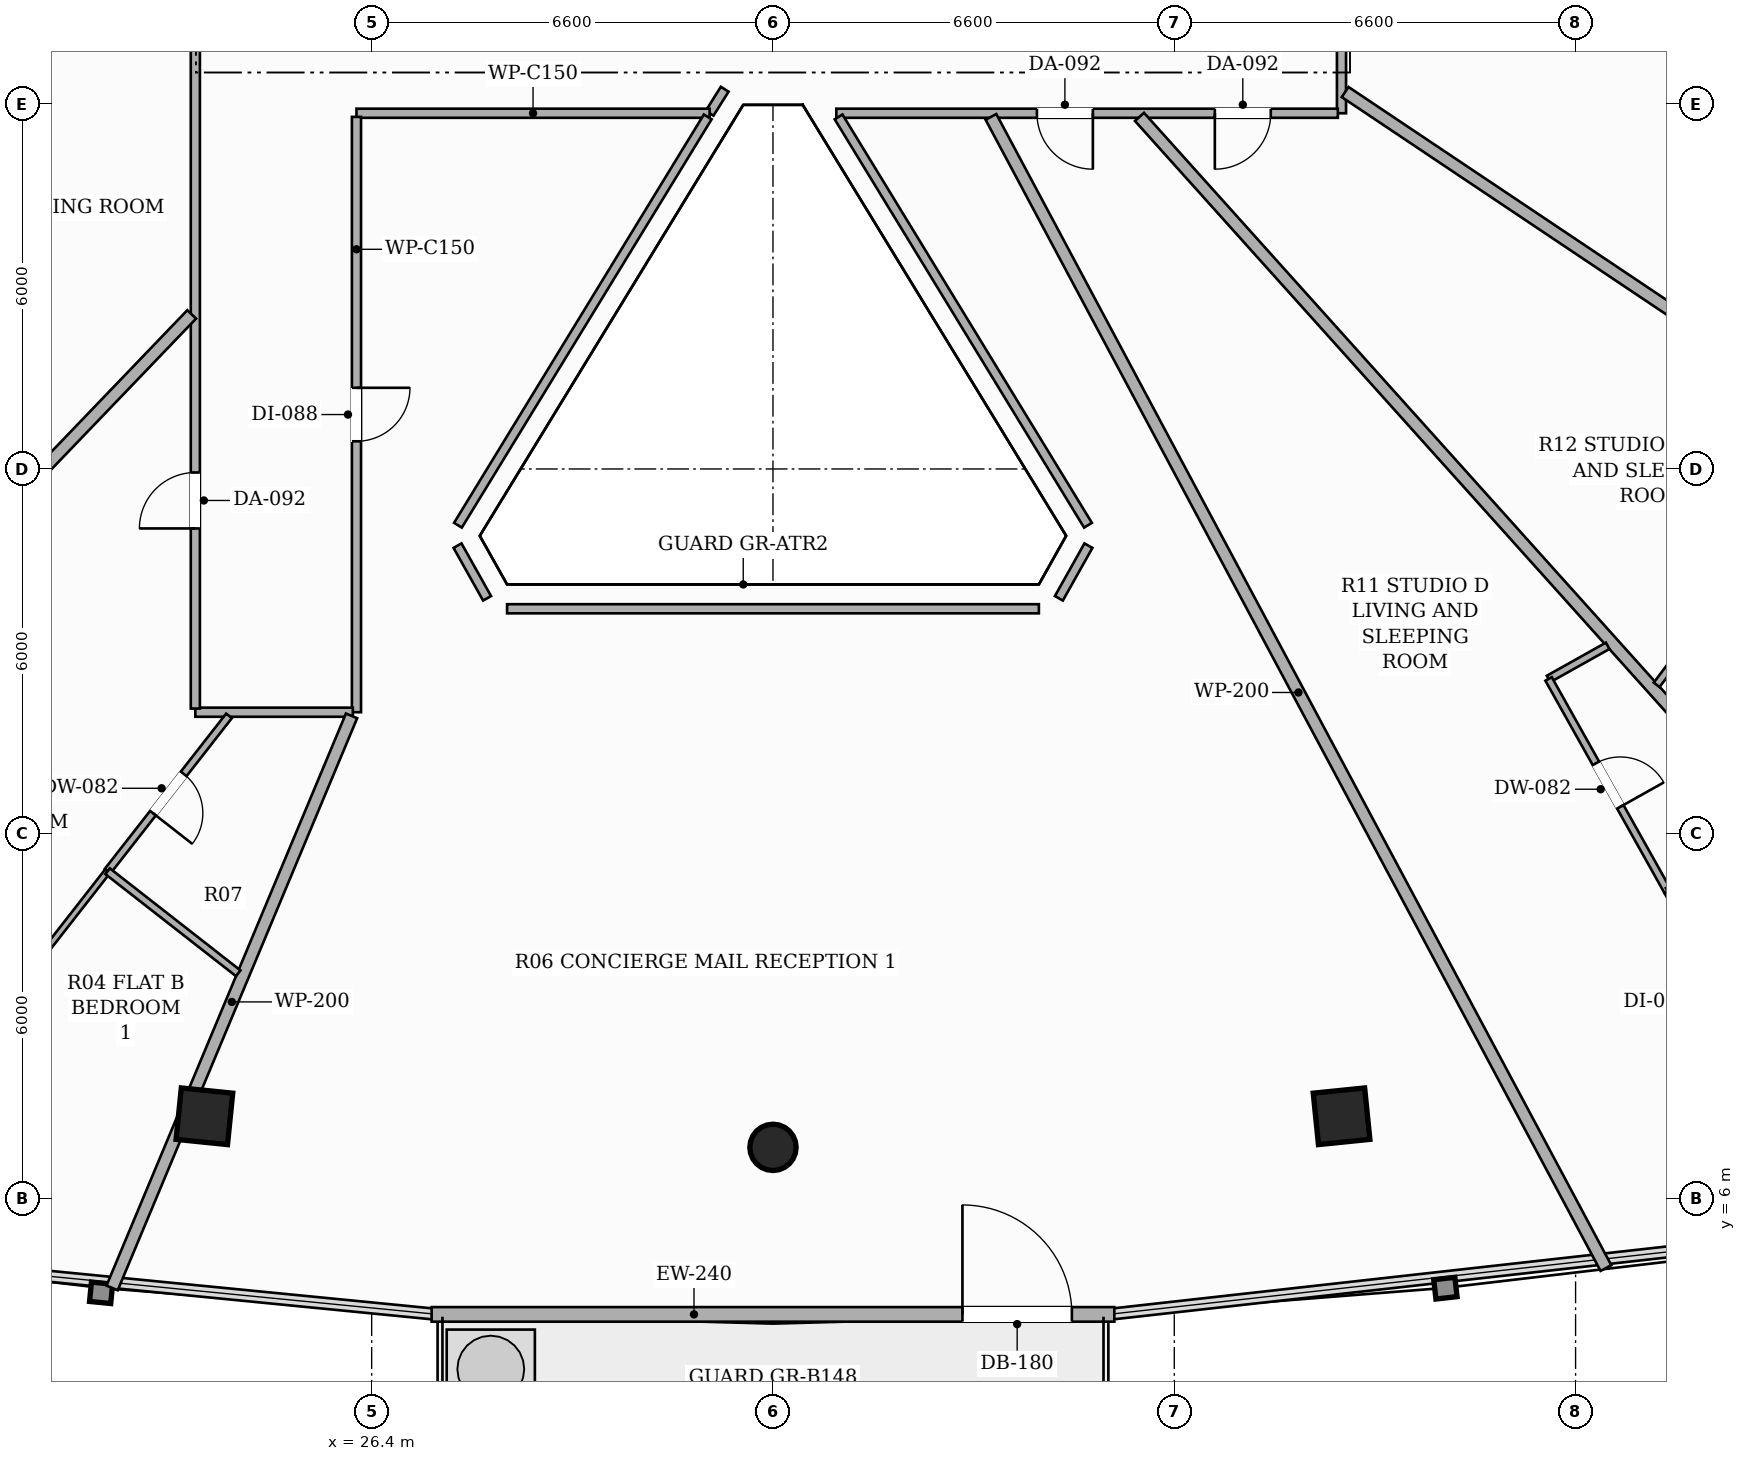
"""IFC4 building model, lengths in metres.
Left out: names, types, materials, properties, quantities, classifications, styles, units other than length and angle.
Written with IfcOpenShell. Run it as: python <this file> out.ifc"""

import sys

from ifc_helpers import new_model, si_unit, direction, frame, frame_2d, origin, origin_2d, place, context, subcontext, project, spatial, rectangle, hollow_rectangle, hollow_circle, extrude, element, fill, save


model = new_model("IFC4")
c1 = context("Model", 3, precision=1e-05, world=origin(), true_north=direction((0.0, 1.0)))
c2 = subcontext(c1, "Body", "Model", "MODEL_VIEW")
j1 = project(units=[si_unit("LENGTHUNIT", "METRE"), si_unit("PLANEANGLEUNIT", "RADIAN")], contexts=[c1])
p1 = place(None, origin())
s1 = spatial("IfcSite", under=j1, at=p1, CompositionType="ELEMENT")
p2 = place(p1, origin())
s2 = spatial("IfcBuilding", under=s1, at=p2, CompositionType="ELEMENT")
p3 = place(p2, frame((0.0, 0.0, 183.65)))
s3 = spatial("IfcBuildingStorey", under=s2, at=p3, CompositionType="ELEMENT", Elevation=183.65)
p4 = place(p3, frame((23.649, 7.355, 0.0), z_axis=(0.0, 0.0, 1.0), x_axis=(-0.994880708829, 0.101056297183, 0.0)))
e1 = element("IfcColumn", 1, at=p4, inside=s3, PredefinedType="COLUMN", context=c2, shape_type="SweptSolid", body=[
    extrude(hollow_rectangle(XDim=0.85, YDim=0.85, WallThickness=0.028, at=origin_2d()), origin(), (0.0, 0.0, 1.0), 3.3),
])
p5 = place(p3, frame((33.0, 6.844, 0.0), z_axis=(0.0, 0.0, 1.0), x_axis=(1.0, 0.0, 0.0)))
e2 = element("IfcColumn", 2, at=p5, inside=s3, PredefinedType="COLUMN", context=c2, shape_type="SweptSolid", body=[
    extrude(hollow_circle(Radius=0.381, WallThickness=0.022, at=origin_2d()), origin(), (0.0, 0.0, 1.0), 3.3),
])
p6 = place(p3, frame((42.351, 7.355, 0.0), z_axis=(0.0, 0.0, 1.0), x_axis=(0.994880708829, 0.101056297183, 0.0)))
e3 = element("IfcColumn", 3, at=p6, inside=s3, PredefinedType="COLUMN", context=c2, shape_type="SweptSolid", body=[
    extrude(hollow_rectangle(XDim=0.85, YDim=0.85, WallThickness=0.028, at=origin_2d()), origin(), (0.0, 0.0, 1.0), 3.3),
])
p7 = place(p3, frame((27.386, 4.097, 0.0), z_axis=(0.0, 0.0, 1.0), x_axis=(1.0, 0.0, 0.0)))
e4 = element("IfcWall", 4, at=p7, inside=s3, PredefinedType="SOLIDWALL", context=c2, shape_type="SweptSolid", body=[
    extrude(rectangle(XDim=11.228, YDim=0.24, at=frame_2d((5.614, 0.0))), origin(), (0.0, 0.0, 1.0), 2.584),
])
p8 = place(p7, frame((8.73, 0.0, 0.0)))
e5 = element("IfcOpeningElement", 5, at=p8, cuts=e4, PredefinedType="OPENING", context=c2, shape_type="SweptSolid", body=[
    extrude(rectangle(XDim=1.8, YDim=2.2, at=frame_2d((0.9, 1.1))), frame((0.0, 0.13, 0.0), z_axis=(0.0, -1.0, 0.0), x_axis=(1.0, 0.0, 0.0)), (0.0, 0.0, 1.0), 0.26),
])
p9 = place(p3, frame((50.652, 24.373, 0.0), z_axis=(0.0, 0.0, 1.0), x_axis=(-0.514290689074, 0.857615932182, 0.0)))
e6 = element("IfcWall", 6, at=p9, inside=s3, PredefinedType="SOLIDWALL", context=c2, shape_type="SweptSolid", body=[
    extrude(rectangle(XDim=10.856, YDim=0.24, at=frame_2d((5.428, 0.0))), origin(), (0.0, 0.0, 1.0), 2.584),
])
p10 = place(p9, frame((8.358, 0.0, 0.0)))
e7 = element("IfcOpeningElement", 7, at=p10, cuts=e6, PredefinedType="OPENING", context=c2, shape_type="SweptSolid", body=[
    extrude(rectangle(XDim=1.8, YDim=2.2, at=frame_2d((0.9, 1.1))), frame((0.0, 0.13, 0.0), z_axis=(0.0, -1.0, 0.0), x_axis=(1.0, 0.0, 0.0)), (0.0, 0.0, 1.0), 0.26),
])
p11 = place(p3, frame((32.206, 24.245, 0.0), z_axis=(0.0, 0.0, 1.0), x_axis=(-0.531785592992, -0.84687902506, 0.0)))
e8 = element("IfcWall", 8, at=p11, inside=s3, PredefinedType="PARTITIONING", context=c2, shape_type="SweptSolid", body=[
    extrude(rectangle(XDim=0.467, YDim=0.15, at=frame_2d((0.233, 0.0))), origin(), (0.0, 0.0, 1.0), 3.02),
])
p12 = place(p3, frame((31.958, 23.85, 0.0), z_axis=(0.0, 0.0, 1.0), x_axis=(-1.0, 0.0, 0.0)))
e9 = element("IfcWall", 9, at=p12, inside=s3, PredefinedType="PARTITIONING", context=c2, shape_type="SweptSolid", body=[
    extrude(rectangle(XDim=5.808, YDim=0.15, at=frame_2d((2.904, 0.0))), origin(), (0.0, 0.0, 1.0), 2.681),
])
p13 = place(p3, frame((26.15, 23.79, 0.0), z_axis=(0.0, 0.0, 1.0), x_axis=(0.0, -1.0, 0.0)))
e10 = element("IfcWall", 10, at=p13, inside=s3, PredefinedType="PARTITIONING", context=c2, shape_type="SweptSolid", body=[
    extrude(rectangle(XDim=9.79, YDim=0.15, at=frame_2d((4.895, 0.0))), origin(), (0.0, 0.0, 1.0), 2.681),
])
p14 = place(p13, frame((4.455, 0.0, 0.0)))
e11 = element("IfcOpeningElement", 11, at=p14, cuts=e10, PredefinedType="OPENING", context=c2, shape_type="SweptSolid", body=[
    extrude(rectangle(XDim=0.88, YDim=2.1, at=frame_2d((0.44, 1.05))), frame((0.0, 0.085, 0.0), z_axis=(0.0, -1.0, 0.0), x_axis=(1.0, 0.0, 0.0)), (0.0, 0.0, 1.0), 0.17),
])
p15 = place(p3, frame((26.09, 14.0, 0.0), z_axis=(0.0, 0.0, 1.0), x_axis=(-1.0, 0.0, 0.0)))
e12 = element("IfcWall", 12, at=p15, inside=s3, PredefinedType="PARTITIONING", context=c2, shape_type="SweptSolid", body=[
    extrude(rectangle(XDim=2.59, YDim=0.15, at=frame_2d((1.295, 0.0))), origin(), (0.0, 0.0, 1.0), 2.681),
])
p16 = place(p3, frame((23.5, 14.06, 0.0), z_axis=(0.0, 0.0, 1.0), x_axis=(0.0, 1.0, 0.0)))
e13 = element("IfcWall", 13, at=p16, inside=s3, PredefinedType="PARTITIONING", context=c2, shape_type="SweptSolid", body=[
    extrude(rectangle(XDim=23.181, YDim=0.15, at=frame_2d((11.59, 0.0))), origin(), (0.0, 0.0, 1.0), 2.373),
])
p17 = place(p16, frame((14.184, 0.0, 0.0)))
e14 = element("IfcOpeningElement", 14, at=p17, cuts=e13, PredefinedType="OPENING", context=c2, shape_type="SweptSolid", body=[
    extrude(rectangle(XDim=0.92, YDim=2.15, at=frame_2d((0.46, 1.075))), frame((0.0, 0.085, 0.0), z_axis=(0.0, -1.0, 0.0), x_axis=(1.0, 0.0, 0.0)), (0.0, 0.0, 1.0), 0.17),
])
p18 = place(p16, frame((2.962, 0.0, 0.0)))
e15 = element("IfcOpeningElement", 15, at=p18, cuts=e13, PredefinedType="OPENING", context=c2, shape_type="SweptSolid", body=[
    extrude(rectangle(XDim=0.92, YDim=2.15, at=frame_2d((0.46, 1.075))), frame((0.0, 0.085, 0.0), z_axis=(0.0, -1.0, 0.0), x_axis=(1.0, 0.0, 0.0)), (0.0, 0.0, 1.0), 0.17),
])
p19 = place(p3, frame((42.35, 28.34, 0.0), z_axis=(0.0, 0.0, 1.0), x_axis=(0.0, -1.0, 0.0)))
e16 = element("IfcWall", 16, at=p19, inside=s3, PredefinedType="PARTITIONING", context=c2, shape_type="SweptSolid", body=[
    extrude(rectangle(XDim=4.49, YDim=0.15, at=frame_2d((2.245, 0.0))), origin(), (0.0, 0.0, 1.0), 2.681),
])
p20 = place(p19, frame((1.783, 0.0, 0.0)))
e17 = element("IfcOpeningElement", 17, at=p20, cuts=e16, PredefinedType="OPENING", context=c2, shape_type="SweptSolid", body=[
    extrude(rectangle(XDim=0.88, YDim=2.1, at=frame_2d((0.44, 1.05))), frame((0.0, 0.085, 0.0), z_axis=(0.0, -1.0, 0.0), x_axis=(1.0, 0.0, 0.0)), (0.0, 0.0, 1.0), 0.17),
])
p21 = place(p3, frame((42.29, 23.85, 0.0), z_axis=(0.0, 0.0, 1.0), x_axis=(-1.0, 0.0, 0.0)))
e18 = element("IfcWall", 18, at=p21, inside=s3, PredefinedType="PARTITIONING", context=c2, shape_type="SweptSolid", body=[
    extrude(rectangle(XDim=8.248, YDim=0.15, at=frame_2d((4.124, 0.0))), origin(), (0.0, 0.0, 1.0), 2.452),
])
p22 = place(p21, frame((1.103, 0.0, 0.0)))
e19 = element("IfcOpeningElement", 19, at=p22, cuts=e18, PredefinedType="OPENING", context=c2, shape_type="SweptSolid", body=[
    extrude(rectangle(XDim=0.92, YDim=2.15, at=frame_2d((0.46, 1.075))), frame((0.0, 0.085, 0.0), z_axis=(0.0, -1.0, 0.0), x_axis=(1.0, 0.0, 0.0)), (0.0, 0.0, 1.0), 0.17),
])
p23 = place(p21, frame((4.029, 0.0, 0.0)))
e20 = element("IfcOpeningElement", 20, at=p23, cuts=e18, PredefinedType="OPENING", context=c2, shape_type="SweptSolid", body=[
    extrude(rectangle(XDim=0.92, YDim=2.15, at=frame_2d((0.46, 1.075))), frame((0.0, 0.085, 0.0), z_axis=(0.0, -1.0, 0.0), x_axis=(1.0, 0.0, 0.0)), (0.0, 0.0, 1.0), 0.17),
])
p24 = place(p3, frame((34.079, 23.79, 0.0), z_axis=(0.0, 0.0, 1.0), x_axis=(0.521278062647, -0.853386888465, 0.0)))
e21 = element("IfcWall", 21, at=p24, inside=s3, PredefinedType="PARTITIONING", context=c2, shape_type="SweptSolid", body=[
    extrude(rectangle(XDim=7.869, YDim=0.15, at=frame_2d((3.934, 0.0))), origin(), (0.0, 0.0, 1.0), 2.681),
])
p25 = place(p3, frame((38.188, 16.739, 0.0), z_axis=(0.0, 0.0, 1.0), x_axis=(-0.489479004575, -0.872015082485, 0.0)))
e22 = element("IfcWall", 22, at=p25, inside=s3, PredefinedType="PARTITIONING", context=c2, shape_type="SweptSolid", body=[
    extrude(rectangle(XDim=0.993, YDim=0.15, at=frame_2d((0.497, 0.0))), origin(), (0.0, 0.0, 1.0), 3.02),
])
p26 = place(p3, frame((37.373, 15.701, 0.0), z_axis=(0.0, 0.0, 1.0), x_axis=(-1.0, 0.0, 0.0)))
e23 = element("IfcWall", 23, at=p26, inside=s3, PredefinedType="PARTITIONING", context=c2, shape_type="SweptSolid", body=[
    extrude(rectangle(XDim=8.746, YDim=0.15, at=frame_2d((4.373, 0.0))), origin(), (0.0, 0.0, 1.0), 2.681),
])
p27 = place(p3, frame((28.298, 15.873, 0.0), z_axis=(0.0, 0.0, 1.0), x_axis=(-0.489479004575, 0.872015082485, 0.0)))
e24 = element("IfcWall", 24, at=p27, inside=s3, PredefinedType="PARTITIONING", context=c2, shape_type="SweptSolid", body=[
    extrude(rectangle(XDim=0.993, YDim=0.15, at=frame_2d((0.497, 0.0))), origin(), (0.0, 0.0, 1.0), 3.02),
])
p28 = place(p3, frame((27.819, 17.075, 0.0), z_axis=(0.0, 0.0, 1.0), x_axis=(0.52184261318, 0.853041785066, 0.0)))
e25 = element("IfcWall", 25, at=p28, inside=s3, PredefinedType="PARTITIONING", context=c2, shape_type="SweptSolid", body=[
    extrude(rectangle(XDim=7.872, YDim=0.15, at=frame_2d((3.936, 0.0))), origin(), (0.0, 0.0, 1.0), 2.681),
])
p29 = place(p3, frame((22.131, 4.532, 0.0), z_axis=(0.0, 0.0, 1.0), x_axis=(0.38611914038, 0.922448919687, 0.0)))
e26 = element("IfcWall", 26, at=p29, inside=s3, PredefinedType="PARTITIONING", context=c2, shape_type="SweptSolid", body=[
    extrude(rectangle(XDim=10.199, YDim=0.2, at=frame_2d((5.1, 0.0))), origin(), (0.0, 0.0, 1.0), 2.373),
])
p30 = place(p3, frame((36.585, 23.79, 0.0), z_axis=(0.0, 0.0, 1.0), x_axis=(0.47121923303, -0.88201611914, 0.0)))
e27 = element("IfcWall", 27, at=p30, inside=s3, PredefinedType="PARTITIONING", context=c2, shape_type="SweptSolid", body=[
    extrude(rectangle(XDim=21.463, YDim=0.2, at=frame_2d((10.732, 0.0))), origin(), (0.0, 0.0, 1.0), 2.373),
])
p31 = place(p3, frame((54.571, 16.055, 0.0), z_axis=(0.0, 0.0, 1.0), x_axis=(-0.830893680957, 0.556431209535, 0.0)))
e28 = element("IfcWall", 28, at=p31, inside=s3, PredefinedType="PARTITIONING", context=c2, shape_type="SweptSolid", body=[
    extrude(rectangle(XDim=14.636, YDim=0.2, at=frame_2d((7.318, 0.0))), origin(), (0.0, 0.0, 1.0), 2.373),
])
p32 = place(p3, frame((23.44, 20.542, 0.0), z_axis=(0.0, 0.0, 1.0), x_axis=(-0.692558302481, -0.721361904777, 0.0)))
e29 = element("IfcWall", 29, at=p32, inside=s3, PredefinedType="PARTITIONING", context=c2, shape_type="SweptSolid", body=[
    extrude(rectangle(XDim=19.58, YDim=0.2, at=frame_2d((9.79, 0.0))), origin(), (0.0, 0.0, 1.0), 2.373),
])
p33 = place(p3, frame((55.049, 5.957, 0.0), z_axis=(0.0, 0.0, 1.0), x_axis=(-0.668302779631, 0.743889369958, 0.0)))
e30 = element("IfcWall", 30, at=p33, inside=s3, PredefinedType="PARTITIONING", context=c2, shape_type="SweptSolid", body=[
    extrude(rectangle(XDim=23.973, YDim=0.2, at=frame_2d((11.986, 0.0))), origin(), (0.0, 0.0, 1.0), 2.373),
])
p34 = place(p3, frame((24.054, 13.94, 0.0), z_axis=(0.0, 0.0, 1.0), x_axis=(-0.615841255229, -0.787870261121, 0.0)))
e31 = element("IfcWall", 31, at=p34, inside=s3, PredefinedType="PARTITIONING", context=c2, shape_type="SweptSolid", body=[
    extrude(rectangle(XDim=3.243, YDim=0.12, at=frame_2d((1.622, 0.0))), origin(), (0.0, 0.0, 1.0), 2.681),
])
p35 = place(p34, frame((1.211, 0.0, 0.0)))
e32 = element("IfcOpeningElement", 32, at=p35, cuts=e31, PredefinedType="OPENING", context=c2, shape_type="SweptSolid", body=[
    extrude(rectangle(XDim=0.82, YDim=2.1, at=frame_2d((0.41, 1.05))), frame((0.0, 0.07, 0.0), z_axis=(0.0, -1.0, 0.0), x_axis=(1.0, 0.0, 0.0)), (0.0, 0.0, 1.0), 0.14),
])
p36 = place(p3, frame((22.057, 11.385, 0.0), z_axis=(0.0, 0.0, 1.0), x_axis=(-0.61561191154, -0.78804947457, 0.0)))
e33 = element("IfcWall", 33, at=p36, inside=s3, PredefinedType="PARTITIONING", context=c2, shape_type="SweptSolid", body=[
    extrude(rectangle(XDim=7.963, YDim=0.1, at=frame_2d((3.981, 0.0))), origin(), (0.0, 0.0, 1.0), 2.373),
])
p37 = place(p36, frame((3.541, 0.0, 0.0)))
e34 = element("IfcOpeningElement", 34, at=p37, cuts=e33, PredefinedType="OPENING", context=c2, shape_type="SweptSolid", body=[
    extrude(rectangle(XDim=0.88, YDim=2.1, at=frame_2d((0.44, 1.05))), frame((0.0, 0.06, 0.0), z_axis=(0.0, -1.0, 0.0), x_axis=(1.0, 0.0, 0.0)), (0.0, 0.0, 1.0), 0.12),
])
p38 = place(p3, frame((24.205, 9.707, 0.0), z_axis=(0.0, 0.0, 1.0), x_axis=(-0.788077327334, 0.615576255343, 0.0)))
e35 = element("IfcWall", 35, at=p38, inside=s3, PredefinedType="PARTITIONING", context=c2, shape_type="SweptSolid", body=[
    extrude(rectangle(XDim=2.726, YDim=0.12, at=frame_2d((1.363, 0.0))), origin(), (0.0, 0.0, 1.0), 2.681),
])
p39 = place(p3, frame((48.562, 15.819, 0.0), z_axis=(0.0, 0.0, 1.0), x_axis=(-0.600820734403, -0.799383790874, 0.0)))
e36 = element("IfcWall", 36, at=p39, inside=s3, PredefinedType="PARTITIONING", context=c2, shape_type="SweptSolid", body=[
    extrude(rectangle(XDim=1.713, YDim=0.12, at=frame_2d((0.856, 0.0))), origin(), (0.0, 0.0, 1.0), 2.452),
])
p40 = place(p3, frame((46.728, 15.092, 0.0), z_axis=(0.0, 0.0, 1.0), x_axis=(-0.872259310975, -0.489043652875, 0.0)))
e37 = element("IfcWall", 37, at=p40, inside=s3, PredefinedType="PARTITIONING", context=c2, shape_type="SweptSolid", body=[
    extrude(rectangle(XDim=1.114, YDim=0.12, at=frame_2d((0.557, 0.0))), origin(), (0.0, 0.0, 1.0), 3.02),
])
p41 = place(p3, frame((45.756, 14.547, 0.0), z_axis=(0.0, 0.0, 1.0), x_axis=(0.489160448732, -0.872193817564, 0.0)))
e38 = element("IfcWall", 38, at=p41, inside=s3, PredefinedType="PARTITIONING", context=c2, shape_type="SweptSolid", body=[
    extrude(rectangle(XDim=4.003, YDim=0.12, at=frame_2d((2.001, 0.0))), origin(), (0.0, 0.0, 1.0), 3.02),
])
p42 = place(p41, frame((1.591, 0.0, 0.0)))
e39 = element("IfcOpeningElement", 39, at=p42, cuts=e38, PredefinedType="OPENING", context=c2, shape_type="SweptSolid", body=[
    extrude(rectangle(XDim=0.82, YDim=2.1, at=frame_2d((0.41, 1.05))), frame((0.0, 0.07, 0.0), z_axis=(0.0, -1.0, 0.0), x_axis=(1.0, 0.0, 0.0)), (0.0, 0.0, 1.0), 0.14),
])
p43 = place(p3, frame((47.714, 11.056, 0.0), z_axis=(0.0, 0.0, 1.0), x_axis=(0.489058521283, -0.87225097464, 0.0)))
e40 = element("IfcWall", 40, at=p43, inside=s3, PredefinedType="PARTITIONING", context=c2, shape_type="SweptSolid", body=[
    extrude(rectangle(XDim=4.001, YDim=0.12, at=frame_2d((2.0, 0.0))), origin(), (0.0, 0.0, 1.0), 2.373),
])
p44 = place(p43, frame((1.561, 0.0, 0.0)))
e41 = element("IfcOpeningElement", 41, at=p44, cuts=e40, PredefinedType="OPENING", context=c2, shape_type="SweptSolid", body=[
    extrude(rectangle(XDim=0.88, YDim=2.1, at=frame_2d((0.44, 1.05))), frame((0.0, 0.07, 0.0), z_axis=(0.0, -1.0, 0.0), x_axis=(1.0, 0.0, 0.0)), (0.0, 0.0, 1.0), 0.14),
])
p45 = place(p3, frame((49.469, 12.041, 0.0), z_axis=(0.0, 0.0, 1.0), x_axis=(-0.872002863311, -0.489500772602, 0.0)))
e42 = element("IfcWall", 42, at=p45, inside=s3, PredefinedType="PARTITIONING", context=c2, shape_type="SweptSolid", body=[
    extrude(rectangle(XDim=2.012, YDim=0.12, at=frame_2d((1.006, 0.0))), origin(), (0.0, 0.0, 1.0), 3.02),
])
p46 = place(p8, origin())
e43 = element("IfcDoor", 43, at=p46, inside=s3, OperationType="SINGLE_SWING_LEFT", PredefinedType="DOOR", context=c2, shape_type="SweptSolid", body=[
    extrude(rectangle(XDim=1.8, YDim=2.2, at=frame_2d((0.9, 1.1))), frame((0.0, 0.025, 0.0), z_axis=(0.0, -1.0, 0.0), x_axis=(1.0, 0.0, 0.0)), (0.0, 0.0, 1.0), 0.05),
])
fill(e5, e43)
p47 = place(p14, origin())
e44 = element("IfcDoor", 44, at=p47, inside=s3, OperationType="SINGLE_SWING_LEFT", PredefinedType="DOOR", context=c2, shape_type="SweptSolid", body=[
    extrude(rectangle(XDim=0.88, YDim=2.1, at=frame_2d((0.44, 1.05))), frame((0.0, 0.025, 0.0), z_axis=(0.0, -1.0, 0.0), x_axis=(1.0, 0.0, 0.0)), (0.0, 0.0, 1.0), 0.05),
])
fill(e11, e44)
p48 = place(p18, origin())
e45 = element("IfcDoor", 45, at=p48, inside=s3, OperationType="SINGLE_SWING_LEFT", PredefinedType="DOOR", context=c2, shape_type="SweptSolid", body=[
    extrude(rectangle(XDim=0.92, YDim=2.15, at=frame_2d((0.46, 1.075))), frame((0.0, 0.025, 0.0), z_axis=(0.0, -1.0, 0.0), x_axis=(1.0, 0.0, 0.0)), (0.0, 0.0, 1.0), 0.05),
])
fill(e15, e45)
p49 = place(p35, origin())
e46 = element("IfcDoor", 46, at=p49, inside=s3, OperationType="SINGLE_SWING_RIGHT", PredefinedType="DOOR", context=c2, shape_type="SweptSolid", body=[
    extrude(rectangle(XDim=0.82, YDim=2.1, at=frame_2d((0.41, 1.05))), frame((0.0, 0.025, 0.0), z_axis=(0.0, -1.0, 0.0), x_axis=(1.0, 0.0, 0.0)), (0.0, 0.0, 1.0), 0.05),
])
fill(e32, e46)
p50 = place(p22, origin())
e47 = element("IfcDoor", 47, at=p50, inside=s3, OperationType="SINGLE_SWING_RIGHT", PredefinedType="DOOR", context=c2, shape_type="SweptSolid", body=[
    extrude(rectangle(XDim=0.92, YDim=2.15, at=frame_2d((0.46, 1.075))), frame((0.0, 0.025, 0.0), z_axis=(0.0, -1.0, 0.0), x_axis=(1.0, 0.0, 0.0)), (0.0, 0.0, 1.0), 0.05),
])
fill(e19, e47)
p51 = place(p23, origin())
e48 = element("IfcDoor", 48, at=p51, inside=s3, OperationType="SINGLE_SWING_LEFT", PredefinedType="DOOR", context=c2, shape_type="SweptSolid", body=[
    extrude(rectangle(XDim=0.92, YDim=2.15, at=frame_2d((0.46, 1.075))), frame((0.0, 0.025, 0.0), z_axis=(0.0, -1.0, 0.0), x_axis=(1.0, 0.0, 0.0)), (0.0, 0.0, 1.0), 0.05),
])
fill(e20, e48)
p52 = place(p42, origin())
e49 = element("IfcDoor", 49, at=p52, inside=s3, OperationType="SINGLE_SWING_RIGHT", PredefinedType="DOOR", context=c2, shape_type="SweptSolid", body=[
    extrude(rectangle(XDim=0.82, YDim=2.1, at=frame_2d((0.41, 1.05))), frame((0.0, 0.025, 0.0), z_axis=(0.0, -1.0, 0.0), x_axis=(1.0, 0.0, 0.0)), (0.0, 0.0, 1.0), 0.05),
])
fill(e39, e49)
save(model, sys.argv[1])
